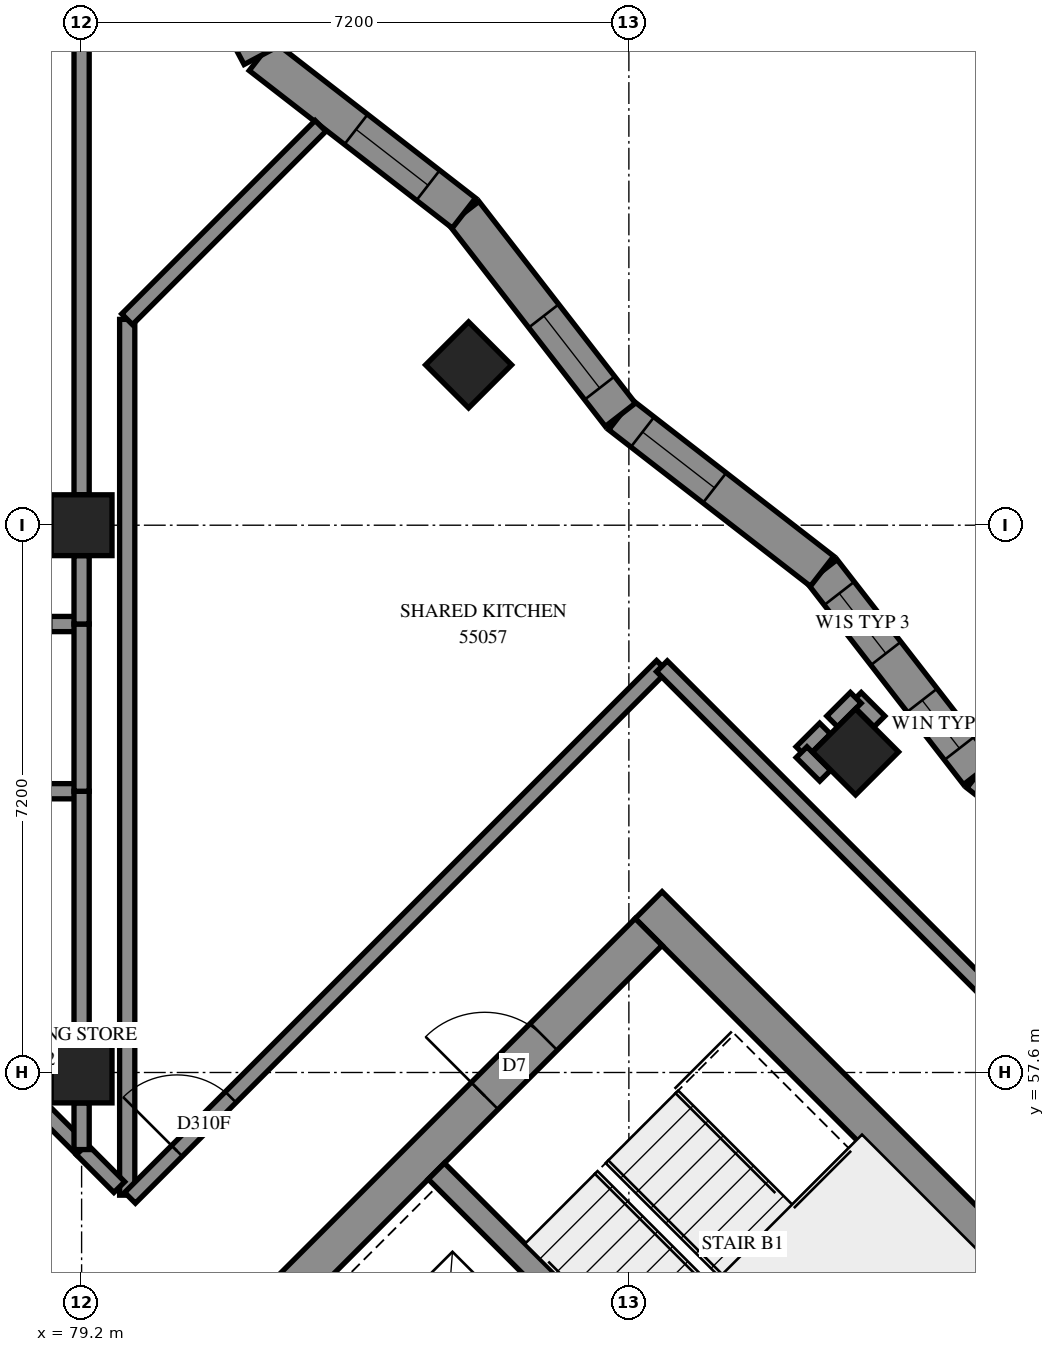
"""IFC4 building model, lengths in metres.
Left out: names, types, materials, properties, quantities, classifications, styles, units other than length and angle.
Written with IfcOpenShell. Run it as: python <this file> out.ifc"""

import sys

from ifc_helpers import new_model, si_unit, direction, frame, frame_2d, origin, origin_2d, place, context, subcontext, project, spatial, polyline, rectangle, outline, extrude, element, fill, save


model = new_model("IFC4")
c1 = context("Model", 3, precision=1e-05, world=origin(), true_north=direction((0.0, 1.0)))
c2 = subcontext(c1, "Body", "Model", "MODEL_VIEW")
j1 = project(units=[si_unit("LENGTHUNIT", "METRE"), si_unit("PLANEANGLEUNIT", "RADIAN")], contexts=[c1])
p1 = place(None, origin())
s1 = spatial("IfcSite", under=j1, at=p1, CompositionType="ELEMENT")
p2 = place(p1, origin())
s2 = spatial("IfcBuilding", under=s1, at=p2, CompositionType="ELEMENT")
p3 = place(p2, frame((0.0, 0.0, 203.2)))
s3 = spatial("IfcBuildingStorey", under=s2, at=p3, CompositionType="ELEMENT", Elevation=203.2)
for number, where, z_axis, x_axis in (
    (1, (79.2, 57.6, 0.0), (0.0, 0.0, 1.0), (1.0, 0.0, 0.0)),
    (2, (79.2, 64.8, 0.0), (0.0, 0.0, 1.0), (1.0, 0.0, 0.0)),
    (3, (84.291, 66.909, 0.0), (0.0, 0.0, 1.0), (0.707, -0.707, 0.0)),
    (4, (89.382, 61.818, 0.0), (0.0, 0.0, 1.0), (0.707, -0.707, 0.0)),
):
    element("IfcColumn", number, at=place(p3, frame(where, z_axis=z_axis, x_axis=x_axis)), inside=s3, PredefinedType="COLUMN", context=c2, shape_type="SweptSolid", body=[
        extrude(rectangle(XDim=0.8, YDim=0.8, at=origin_2d()), origin(), (0.0, 0.0, 1.0), 3.1),
    ])
p4 = place(p3, frame((86.66, 59.802, -0.3), z_axis=(0.0, 0.0, 1.0), x_axis=(0.7071067812, -0.7071067812, 0.0)))
e5 = element("IfcWall", 5, at=p4, inside=s3, PredefinedType="SHEAR", context=c2, shape_type="SweptSolid", body=[
    extrude(rectangle(XDim=15.4, YDim=0.5, at=frame_2d((7.7, 0.0))), origin(), (0.0, 0.0, 1.0), 2.7),
])
p5 = place(p4, frame((10.5, 0.0, 0.3)))
e6 = element("IfcOpeningElement", 6, at=p5, cuts=e5, PredefinedType="OPENING", context=c2, shape_type="SweptSolid", body=[
    extrude(rectangle(XDim=0.8, YDim=2.1, at=frame_2d((0.4, 1.05))), frame((0.0, 0.26, 0.0), z_axis=(0.0, -1.0, 0.0), x_axis=(1.0, 0.0, 0.0)), (0.0, 0.0, 1.0), 0.52),
])
p6 = place(p3, frame((76.478, 49.267, -0.3), z_axis=(0.0, 0.0, 1.0), x_axis=(0.7071067812, 0.7071067812, 0.0)))
e7 = element("IfcWall", 7, at=p6, inside=s3, PredefinedType="SHEAR", context=c2, shape_type="SweptSolid", body=[
    extrude(rectangle(XDim=14.4, YDim=0.5, at=frame_2d((7.2, 0.0))), origin(), (0.0, 0.0, 1.0), 2.7),
])
p7 = place(p6, frame((4.55, 0.0, 0.3)))
e8 = element("IfcOpeningElement", 8, at=p7, cuts=e7, PredefinedType="OPENING", context=c2, shape_type="SweptSolid", body=[
    extrude(rectangle(XDim=1.1, YDim=2.1, at=frame_2d((0.55, 1.05))), frame((0.0, 0.26, 0.0), z_axis=(0.0, -1.0, 0.0), x_axis=(1.0, 0.0, 0.0)), (0.0, 0.0, 1.0), 0.52),
])
p8 = place(p6, frame((11.35, 0.0, 0.3)))
e9 = element("IfcOpeningElement", 9, at=p8, cuts=e7, PredefinedType="OPENING", context=c2, shape_type="SweptSolid", body=[
    extrude(rectangle(XDim=1.1, YDim=2.1, at=frame_2d((0.55, 1.05))), frame((0.0, 0.26, 0.0), z_axis=(0.0, -1.0, 0.0), x_axis=(1.0, 0.0, 0.0)), (0.0, 0.0, 1.0), 0.52),
])
p9 = place(p3, frame((83.867, 56.302, 0.0), z_axis=(0.0, 0.0, 1.0), x_axis=(0.7071137256, -0.7070998367, 0.0)))
e10 = element("IfcWall", 10, at=p9, inside=s3, PredefinedType="SOLIDWALL", context=c2, shape_type="SweptSolid", body=[
    extrude(rectangle(XDim=7.2, YDim=0.3, at=frame_2d((3.6, 0.0))), origin(), (0.0, 0.0, 1.0), 3.1),
])
p10 = place(p3, frame((93.654, 59.482, 0.0), z_axis=(0.0, 0.0, 1.0), x_axis=(-0.7901691849, 0.6128887822, 0.0)))
e11 = element("IfcWall", 11, at=p10, inside=s3, PredefinedType="SOLIDWALL", context=c2, shape_type="SweptSolid", body=[
    extrude(outline(polyline([(-0.032, -0.25), (3.327, -0.25), (3.39, 0.25), (0.032, 0.25), (-0.032, -0.25)])), origin(), (0.0, 0.0, 1.0), 3.1),
])
p11 = place(p10, frame((1.52, 0.0, 0.45)))
e12 = element("IfcOpeningElement", 12, at=p11, cuts=e11, PredefinedType="OPENING", context=c2, shape_type="SweptSolid", body=[
    extrude(rectangle(XDim=1.2, YDim=2.5, at=frame_2d((0.6, 1.25))), frame((0.0, 0.26, 0.0), z_axis=(0.0, -1.0, 0.0), x_axis=(1.0, 0.0, 0.0)), (0.0, 0.0, 1.0), 0.52),
])
p12 = place(p3, frame((91.0, 61.541, 0.0), z_axis=(0.0, 0.0, 1.0), x_axis=(-0.6128701911, 0.7901836045, 0.0)))
e13 = element("IfcWall", 13, at=p12, inside=s3, PredefinedType="SOLIDWALL", context=c2, shape_type="SweptSolid", body=[
    extrude(outline(polyline([(0.032, -0.25), (3.39, -0.25), (3.327, 0.25), (-0.032, 0.25), (0.032, -0.25)])), origin(), (0.0, 0.0, 1.0), 3.1),
])
p13 = place(p12, frame((0.41, 0.0, 0.45)))
e14 = element("IfcOpeningElement", 14, at=p13, cuts=e13, PredefinedType="OPENING", context=c2, shape_type="SweptSolid", body=[
    extrude(rectangle(XDim=0.8, YDim=2.5, at=frame_2d((0.4, 1.25))), frame((0.0, 0.26, 0.0), z_axis=(0.0, -1.0, 0.0), x_axis=(1.0, 0.0, 0.0)), (0.0, 0.0, 1.0), 0.52),
])
p14 = place(p12, frame((1.99, 0.0, 0.45)))
e15 = element("IfcOpeningElement", 15, at=p14, cuts=e13, PredefinedType="OPENING", context=c2, shape_type="SweptSolid", body=[
    extrude(rectangle(XDim=1.0, YDim=2.5, at=frame_2d((0.5, 1.25))), frame((0.0, 0.26, 0.0), z_axis=(0.0, -1.0, 0.0), x_axis=(1.0, 0.0, 0.0)), (0.0, 0.0, 1.0), 0.52),
])
p15 = place(p3, frame((88.942, 64.194, 0.0), z_axis=(0.0, 0.0, 1.0), x_axis=(-0.7901836045, 0.6128701911, 0.0)))
e16 = element("IfcWall", 16, at=p15, inside=s3, PredefinedType="SOLIDWALL", context=c2, shape_type="SweptSolid", body=[
    extrude(outline(polyline([(-0.032, -0.25), (3.327, -0.25), (3.39, 0.25), (0.032, 0.25), (-0.032, -0.25)])), origin(), (0.0, 0.0, 1.0), 3.1),
])
p16 = place(p15, frame((1.79, 0.0, 0.45)))
e17 = element("IfcOpeningElement", 17, at=p16, cuts=e16, PredefinedType="OPENING", context=c2, shape_type="SweptSolid", body=[
    extrude(rectangle(XDim=1.2, YDim=2.5, at=frame_2d((0.6, 1.25))), frame((0.0, 0.26, 0.0), z_axis=(0.0, -1.0, 0.0), x_axis=(1.0, 0.0, 0.0)), (0.0, 0.0, 1.0), 0.52),
])
p17 = place(p3, frame((86.288, 66.253, 0.0), z_axis=(0.0, 0.0, 1.0), x_axis=(-0.6128887822, 0.7901691849, 0.0)))
e18 = element("IfcWall", 18, at=p17, inside=s3, PredefinedType="SOLIDWALL", context=c2, shape_type="SweptSolid", body=[
    extrude(outline(polyline([(0.032, -0.25), (3.39, -0.25), (3.327, 0.25), (-0.032, 0.25), (0.032, -0.25)])), origin(), (0.0, 0.0, 1.0), 3.1),
])
p18 = place(p17, frame((0.446, 0.0, 0.45)))
e19 = element("IfcOpeningElement", 19, at=p18, cuts=e18, PredefinedType="OPENING", context=c2, shape_type="SweptSolid", body=[
    extrude(rectangle(XDim=1.2, YDim=2.5, at=frame_2d((0.6, 1.25))), frame((0.0, 0.26, 0.0), z_axis=(0.0, -1.0, 0.0), x_axis=(1.0, 0.0, 0.0)), (0.0, 0.0, 1.0), 0.52),
])
p19 = place(p3, frame((84.23, 68.906, 0.0), z_axis=(0.0, 0.0, 1.0), x_axis=(-0.7901686375, 0.6128894879, 0.0)))
e20 = element("IfcWall", 20, at=p19, inside=s3, PredefinedType="SOLIDWALL", context=c2, shape_type="SweptSolid", body=[
    extrude(outline(polyline([(-0.032, -0.25), (3.327, -0.25), (3.434, 0.25), (0.032, 0.25), (-0.032, -0.25)])), origin(), (0.0, 0.0, 1.0), 3.1),
])
p20 = place(p19, frame((0.596, 0.0, 0.45)))
e21 = element("IfcOpeningElement", 21, at=p20, cuts=e20, PredefinedType="OPENING", context=c2, shape_type="SweptSolid", body=[
    extrude(rectangle(XDim=1.2, YDim=2.5, at=frame_2d((0.6, 1.25))), frame((0.0, 0.26, 0.0), z_axis=(0.0, -1.0, 0.0), x_axis=(1.0, 0.0, 0.0)), (0.0, 0.0, 1.0), 0.52),
])
p21 = place(p3, frame((81.558, 70.978, 0.0), z_axis=(0.0, 0.0, 1.0), x_axis=(-0.4689165571, 0.8832424709, 0.0)))
e22 = element("IfcWall", 22, at=p21, inside=s3, PredefinedType="SOLIDWALL", context=c2, shape_type="SweptSolid", body=[
    extrude(outline(polyline([(0.054, -0.25), (3.539, -0.25), (3.14, 0.25), (-0.054, 0.25), (0.054, -0.25)])), origin(), (0.0, 0.0, 1.0), 3.1),
])
p22 = place(p21, frame((0.75, 0.0, 0.45)))
e23 = element("IfcOpeningElement", 23, at=p22, cuts=e22, PredefinedType="OPENING", context=c2, shape_type="SweptSolid", body=[
    extrude(rectangle(XDim=1.2, YDim=2.5, at=frame_2d((0.6, 1.25))), frame((0.0, 0.26, 0.0), z_axis=(0.0, -1.0, 0.0), x_axis=(1.0, 0.0, 0.0)), (0.0, 0.0, 1.0), 0.52),
])
p23 = place(p3, frame((79.8, 55.986, 0.0), z_axis=(0.0, 0.0, 1.0), x_axis=(0.0, 1.0, 0.0)))
e24 = element("IfcWall", 24, at=p23, inside=s3, PredefinedType="PARTITIONING", context=c2, shape_type="SweptSolid", body=[
    extrude(rectangle(XDim=11.522, YDim=0.2, at=frame_2d((5.761, 0.0))), origin(), (0.0, 0.0, 1.0), 3.1),
])
p24 = place(p3, frame((79.837, 55.951, 0.0), z_axis=(0.0, 0.0, 1.0), x_axis=(0.7071067812, 0.7071067812, 0.0)))
e25 = element("IfcWall", 25, at=p24, inside=s3, PredefinedType="PARTITIONING", context=c2, shape_type="SweptSolid", body=[
    extrude(rectangle(XDim=9.897, YDim=0.2, at=frame_2d((4.948, 0.0))), origin(), (0.0, 0.0, 1.0), 3.1),
])
p25 = place(p24, frame((0.873, 0.0, 0.0)))
e26 = element("IfcOpeningElement", 26, at=p25, cuts=e25, PredefinedType="OPENING", context=c2, shape_type="SweptSolid", body=[
    extrude(rectangle(XDim=1.0, YDim=2.1, at=frame_2d((0.5, 1.05))), frame((0.0, 0.11, 0.0), z_axis=(0.0, -1.0, 0.0), x_axis=(1.0, 0.0, 0.0)), (0.0, 0.0, 1.0), 0.22),
])
p26 = place(p3, frame((86.835, 62.945, 0.0), z_axis=(0.0, 0.0, 1.0), x_axis=(0.7071067812, -0.7071067812, 0.0)))
e27 = element("IfcWall", 27, at=p26, inside=s3, PredefinedType="PARTITIONING", context=c2, shape_type="SweptSolid", body=[
    extrude(rectangle(XDim=9.798, YDim=0.2, at=frame_2d((4.899, 0.0))), origin(), (0.0, 0.0, 1.0), 3.1),
])
p27 = place(p3, frame((74.489, 61.303, 0.0), z_axis=(0.0, 0.0, 1.0), x_axis=(0.7071892763, -0.7070242765, 0.0)))
e28 = element("IfcWall", 28, at=p27, inside=s3, PredefinedType="PARTITIONING", context=c2, shape_type="SweptSolid", body=[
    extrude(rectangle(XDim=6.667, YDim=0.2, at=frame_2d((3.333, 0.0))), origin(), (0.0, 0.0, 1.0), 3.1),
])
p28 = place(p3, frame((79.2, 65.2, 0.0), z_axis=(0.0, 0.0, 1.0), x_axis=(0.0, 1.0, 0.0)))
e29 = element("IfcWall", 29, at=p28, inside=s3, PredefinedType="PARTITIONING", context=c2, shape_type="SweptSolid", body=[
    extrude(rectangle(XDim=6.4, YDim=0.2, at=frame_2d((3.2, 0.0))), origin(), (0.0, 0.0, 1.0), 3.1),
])
p29 = place(p3, frame((74.489, 61.303, 0.0), z_axis=(0.0, 0.0, 1.0), x_axis=(0.9999998105, -0.0006155543, 0.0)))
e30 = element("IfcWall", 30, at=p29, inside=s3, PredefinedType="PARTITIONING", context=c2, shape_type="SweptSolid", body=[
    extrude(rectangle(XDim=4.711, YDim=0.2, at=frame_2d((2.356, 0.0))), origin(), (0.0, 0.0, 1.0), 3.1),
])
p30 = place(p29, frame((1.037, 0.0, 0.0)))
e31 = element("IfcOpeningElement", 31, at=p30, cuts=e30, PredefinedType="OPENING", context=c2, shape_type="SweptSolid", body=[
    extrude(rectangle(XDim=1.0, YDim=2.1, at=frame_2d((0.5, 1.05))), frame((0.0, 0.11, 0.0), z_axis=(0.0, -1.0, 0.0), x_axis=(1.0, 0.0, 0.0)), (0.0, 0.0, 1.0), 0.22),
])
p31 = place(p3, frame((74.602, 63.5, 0.0), z_axis=(0.0, 0.0, 1.0), x_axis=(1.0, 0.0, 0.0)))
e32 = element("IfcWall", 32, at=p31, inside=s3, PredefinedType="PARTITIONING", context=c2, shape_type="SweptSolid", body=[
    extrude(rectangle(XDim=4.598, YDim=0.2, at=frame_2d((2.299, 0.0))), origin(), (0.0, 0.0, 1.0), 3.1),
])
p32 = place(p31, frame((3.298, 0.0, 0.0)))
e33 = element("IfcOpeningElement", 33, at=p32, cuts=e32, PredefinedType="OPENING", context=c2, shape_type="SweptSolid", body=[
    extrude(rectangle(XDim=0.9, YDim=2.1, at=frame_2d((0.45, 1.05))), frame((0.0, 0.11, 0.0), z_axis=(0.0, -1.0, 0.0), x_axis=(1.0, 0.0, 0.0)), (0.0, 0.0, 1.0), 0.22),
])
p33 = place(p3, frame((79.799, 67.509, 0.0), z_axis=(0.0, 0.0, 1.0), x_axis=(0.7070928849, 0.7071206772, 0.0)))
e34 = element("IfcWall", 34, at=p33, inside=s3, PredefinedType="PARTITIONING", context=c2, shape_type="SweptSolid", body=[
    extrude(rectangle(XDim=3.598, YDim=0.2, at=frame_2d((1.799, 0.0))), origin(), (0.0, 0.0, 1.0), 3.1),
])
p34 = place(p3, frame((79.2, 58.0, 0.0), z_axis=(0.0, 0.0, 1.0), x_axis=(0.0, 1.0, 0.0)))
e35 = element("IfcWall", 35, at=p34, inside=s3, PredefinedType="PARTITIONING", context=c2, shape_type="SweptSolid", body=[
    extrude(rectangle(XDim=3.3, YDim=0.2, at=frame_2d((1.65, 0.0))), origin(), (0.0, 0.0, 1.0), 3.1),
])
p35 = place(p3, frame((79.2, 61.3, 0.0), z_axis=(0.0, 0.0, 1.0), x_axis=(0.0, 1.0, 0.0)))
e36 = element("IfcWall", 36, at=p35, inside=s3, PredefinedType="PARTITIONING", context=c2, shape_type="SweptSolid", body=[
    extrude(rectangle(XDim=2.2, YDim=0.2, at=frame_2d((1.1, 0.0))), origin(), (0.0, 0.0, 1.0), 3.1),
])
p36 = place(p3, frame((79.2, 63.5, 0.0), z_axis=(0.0, 0.0, 1.0), x_axis=(0.0, 1.0, 0.0)))
e37 = element("IfcWall", 37, at=p36, inside=s3, PredefinedType="PARTITIONING", context=c2, shape_type="SweptSolid", body=[
    extrude(rectangle(XDim=0.9, YDim=0.2, at=frame_2d((0.45, 0.0))), origin(), (0.0, 0.0, 1.0), 3.1),
])
p37 = place(p3, frame((79.202, 56.588, 0.0), z_axis=(0.0, 0.0, 1.0), x_axis=(0.7056768426, -0.7085338339, 0.0)))
e38 = element("IfcWall", 38, at=p37, inside=s3, PredefinedType="PARTITIONING", context=c2, shape_type="SweptSolid", body=[
    extrude(rectangle(XDim=0.7, YDim=0.2, at=frame_2d((0.35, 0.0))), origin(), (0.0, 0.0, 1.0), 3.1),
])
p38 = place(p3, frame((79.2, 56.586, 0.0), z_axis=(0.0, 0.0, 1.0), x_axis=(0.0, 1.0, 0.0)))
e39 = element("IfcWall", 39, at=p38, inside=s3, PredefinedType="PARTITIONING", context=c2, shape_type="SweptSolid", body=[
    extrude(rectangle(XDim=0.614, YDim=0.2, at=frame_2d((0.307, 0.0))), origin(), (0.0, 0.0, 1.0), 3.1),
])
for number, where, z_axis, x_axis in (
    (40, (88.671, 61.815, 0.0), (0.0, 0.0, 1.0), (0.707, 0.707, 0.0)),
    (41, (88.672, 61.814, 0.0), (0.0, 0.0, 1.0), (0.707, -0.707, 0.0)),
    (42, (89.386, 62.528, 0.0), (0.0, 0.0, 1.0), (0.707, -0.707, 0.0)),
    (43, (89.075, 62.219, 0.0), (0.0, 0.0, 1.0), (0.707, 0.707, 0.0)),
):
    element("IfcWall", number, at=place(p3, frame(where, z_axis=z_axis, x_axis=x_axis)), inside=s3, PredefinedType="PARTITIONING", context=c2, shape_type="SweptSolid", body=[
        extrude(rectangle(XDim=0.438, YDim=0.2, at=frame_2d((0.219, 0.0))), origin(), (0.0, 0.0, 1.0), 3.1),
    ])
p39 = place(p16, origin())
e44 = element("IfcWindow", 44, at=p39, inside=s3, PartitioningType="SINGLE_PANEL", PredefinedType="WINDOW", context=c2, shape_type="SweptSolid", body=[
    extrude(rectangle(XDim=1.2, YDim=2.5, at=frame_2d((0.6, 1.25))), frame((0.0, 0.18, 0.0), z_axis=(0.0, -1.0, 0.0), x_axis=(1.0, 0.0, 0.0)), (0.0, 0.0, 1.0), 0.06),
])
fill(e17, e44)
p40 = place(p18, origin())
e45 = element("IfcWindow", 45, at=p40, inside=s3, PartitioningType="SINGLE_PANEL", PredefinedType="WINDOW", context=c2, shape_type="SweptSolid", body=[
    extrude(rectangle(XDim=1.2, YDim=2.5, at=frame_2d((0.6, 1.25))), frame((0.0, 0.18, 0.0), z_axis=(0.0, -1.0, 0.0), x_axis=(1.0, 0.0, 0.0)), (0.0, 0.0, 1.0), 0.06),
])
fill(e19, e45)
p41 = place(p20, origin())
e46 = element("IfcWindow", 46, at=p41, inside=s3, PartitioningType="SINGLE_PANEL", PredefinedType="WINDOW", context=c2, shape_type="SweptSolid", body=[
    extrude(rectangle(XDim=1.2, YDim=2.5, at=frame_2d((0.6, 1.25))), frame((0.0, 0.18, 0.0), z_axis=(0.0, -1.0, 0.0), x_axis=(1.0, 0.0, 0.0)), (0.0, 0.0, 1.0), 0.06),
])
fill(e21, e46)
p42 = place(p8, origin())
e47 = element("IfcDoor", 47, at=p42, inside=s3, OperationType="SINGLE_SWING_LEFT", PredefinedType="DOOR", context=c2, shape_type="SweptSolid", body=[
    extrude(rectangle(XDim=1.1, YDim=2.1, at=frame_2d((0.55, 1.05))), frame((0.0, 0.025, 0.0), z_axis=(0.0, -1.0, 0.0), x_axis=(1.0, 0.0, 0.0)), (0.0, 0.0, 1.0), 0.05),
])
fill(e9, e47)
p43 = place(p25, origin())
e48 = element("IfcDoor", 48, at=p43, inside=s3, OperationType="SINGLE_SWING_RIGHT", PredefinedType="DOOR", context=c2, shape_type="SweptSolid", body=[
    extrude(rectangle(XDim=1.0, YDim=2.1, at=frame_2d((0.5, 1.05))), frame((0.0, 0.025, 0.0), z_axis=(0.0, -1.0, 0.0), x_axis=(1.0, 0.0, 0.0)), (0.0, 0.0, 1.0), 0.05),
])
fill(e26, e48)
p44 = place(p13, origin())
e49 = element("IfcWindow", 49, at=p44, inside=s3, PartitioningType="SINGLE_PANEL", PredefinedType="WINDOW", context=c2, shape_type="SweptSolid", body=[
    extrude(rectangle(XDim=0.8, YDim=2.5, at=frame_2d((0.4, 1.25))), frame((0.0, 0.18, 0.0), z_axis=(0.0, -1.0, 0.0), x_axis=(1.0, 0.0, 0.0)), (0.0, 0.0, 1.0), 0.06),
])
fill(e14, e49)
p45 = place(p14, origin())
e50 = element("IfcWindow", 50, at=p45, inside=s3, PartitioningType="SINGLE_PANEL", PredefinedType="WINDOW", context=c2, shape_type="SweptSolid", body=[
    extrude(rectangle(XDim=1.0, YDim=2.5, at=frame_2d((0.5, 1.25))), frame((0.0, 0.18, 0.0), z_axis=(0.0, -1.0, 0.0), x_axis=(1.0, 0.0, 0.0)), (0.0, 0.0, 1.0), 0.06),
])
fill(e15, e50)
save(model, sys.argv[1])
